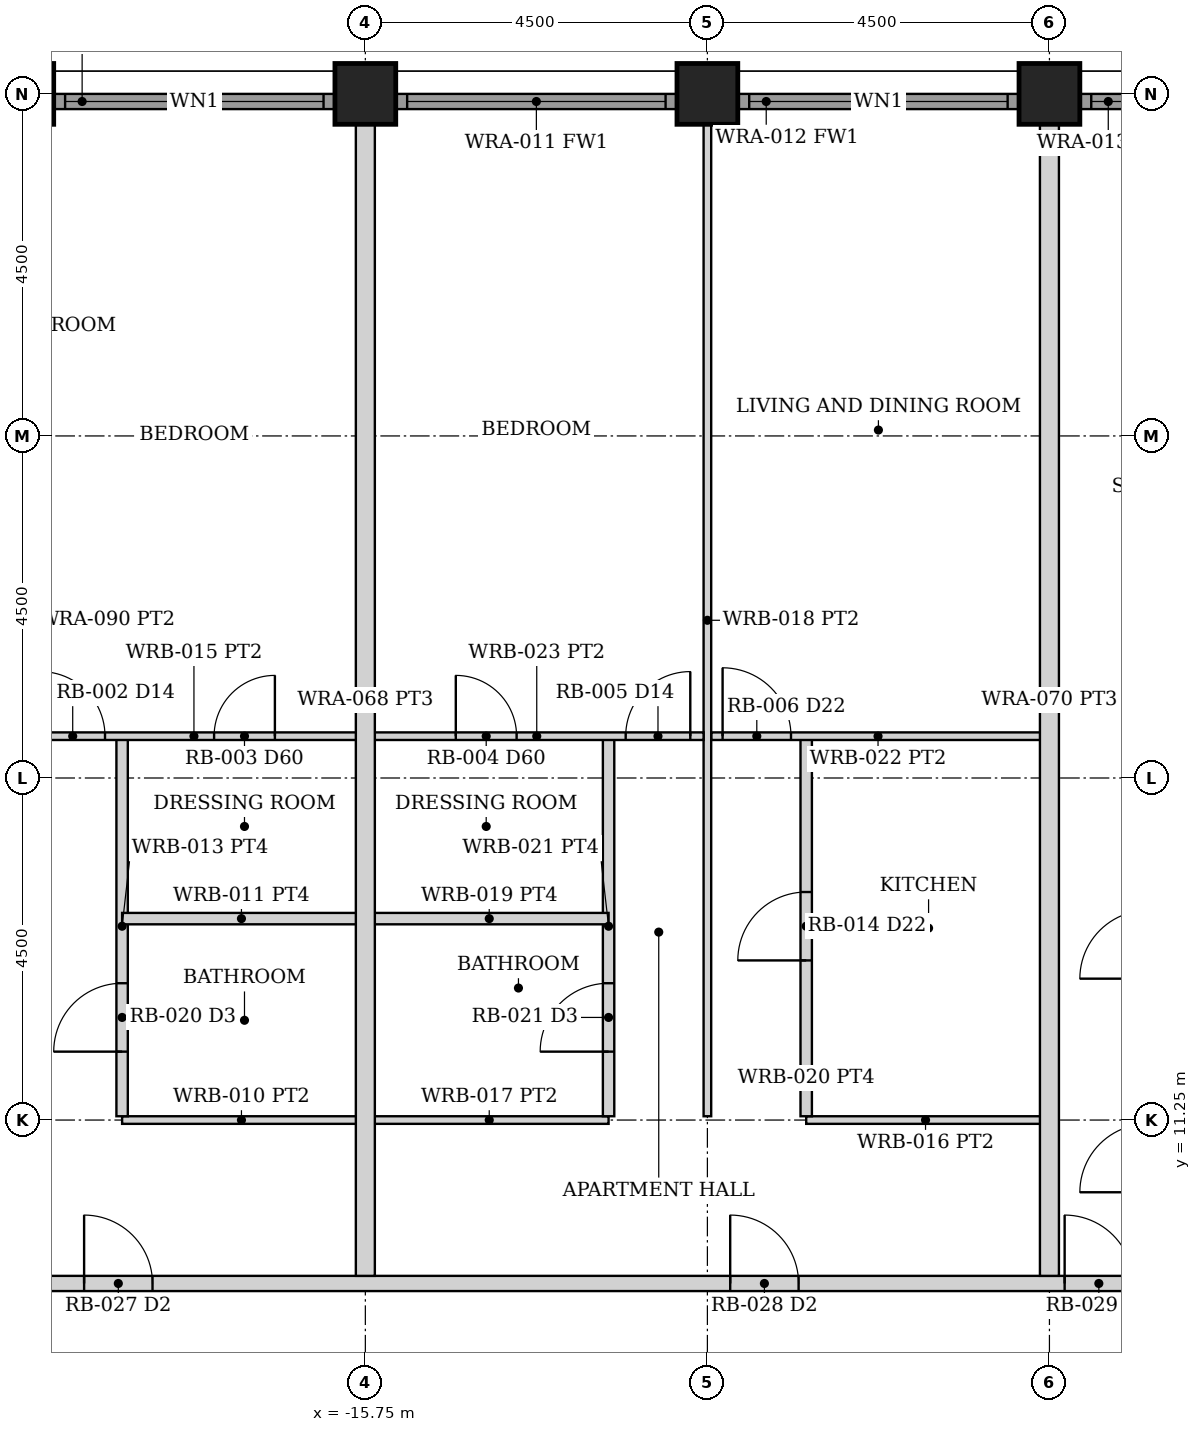
"""IFC4 building model, lengths in metres.
Left out: names, types, materials, properties, quantities, classifications, styles, units other than length and angle.
Written with IfcOpenShell. Run it as: python <this file> out.ifc"""

import sys

from ifc_helpers import new_model, si_unit, direction, frame, frame_2d, origin, origin_2d, place, context, subcontext, project, spatial, rectangle, hollow_rectangle, extrude, element, fill, save


model = new_model("IFC4")
c1 = context("Model", 3, precision=1e-05, world=origin(), true_north=direction((0.0, 1.0)))
c2 = subcontext(c1, "Body", "Model", "MODEL_VIEW")
j1 = project(units=[si_unit("LENGTHUNIT", "METRE"), si_unit("PLANEANGLEUNIT", "RADIAN")], contexts=[c1])
p1 = place(None, origin())
s1 = spatial("IfcSite", under=j1, at=p1, CompositionType="ELEMENT")
p2 = place(p1, origin())
s2 = spatial("IfcBuilding", under=s1, at=p2, CompositionType="ELEMENT")
p3 = place(p2, frame((0.0, 0.0, 37.0)))
s3 = spatial("IfcBuildingStorey", under=s2, at=p3, CompositionType="ELEMENT", Elevation=37.0)
for number, where, z_axis, x_axis in (
    (1, (-20.25, 24.75, 0.0), (0.0, 0.0, 1.0), (0.0, 1.0, 0.0)),
    (2, (-15.75, 24.75, 0.0), (0.0, 0.0, 1.0), (0.0, 1.0, 0.0)),
    (3, (-11.25, 24.75, 0.0), (0.0, 0.0, 1.0), (0.0, 1.0, 0.0)),
    (4, (-6.75, 24.75, 0.0), (0.0, 0.0, 1.0), (0.0, 1.0, 0.0)),
):
    element("IfcColumn", number, at=place(p3, frame(where, z_axis=z_axis, x_axis=x_axis)), inside=s3, PredefinedType="COLUMN", context=c2, shape_type="SweptSolid", body=[
        extrude(hollow_rectangle(XDim=0.8, YDim=0.8, WallThickness=0.07, at=origin_2d()), origin(), (0.0, 0.0, 1.0), 3.5),
    ])
p4 = place(p3, frame((-19.845, 24.65, 0.0), z_axis=(0.0, 0.0, 1.0), x_axis=(1.0, 0.0, 0.0)))
e5 = element("IfcWall", 5, at=p4, inside=s3, PredefinedType="SOLIDWALL", context=c2, shape_type="SweptSolid", body=[
    extrude(rectangle(XDim=3.69, YDim=0.2, at=frame_2d((1.845, 0.0))), origin(), (0.0, 0.0, 1.0), 2.379),
])
p5 = place(p4, frame((0.145, 0.0, 0.3)))
e6 = element("IfcOpeningElement", 6, at=p5, cuts=e5, PredefinedType="OPENING", context=c2, shape_type="SweptSolid", body=[
    extrude(rectangle(XDim=3.4, YDim=1.929, at=frame_2d((1.7, 0.964))), frame((0.0, 0.11, 0.0), z_axis=(0.0, -1.0, 0.0), x_axis=(1.0, 0.0, 0.0)), (0.0, 0.0, 1.0), 0.22),
])
p6 = place(p3, frame((-15.345, 24.65, 0.0), z_axis=(0.0, 0.0, 1.0), x_axis=(1.0, 0.0, 0.0)))
e7 = element("IfcWall", 7, at=p6, inside=s3, PredefinedType="SOLIDWALL", context=c2, shape_type="SweptSolid", body=[
    extrude(rectangle(XDim=3.69, YDim=0.2, at=frame_2d((1.845, 0.0))), origin(), (0.0, 0.0, 1.0), 2.379),
])
p7 = place(p6, frame((0.145, 0.0, 0.3)))
e8 = element("IfcOpeningElement", 8, at=p7, cuts=e7, PredefinedType="OPENING", context=c2, shape_type="SweptSolid", body=[
    extrude(rectangle(XDim=3.4, YDim=1.929, at=frame_2d((1.7, 0.964))), frame((0.0, 0.11, 0.0), z_axis=(0.0, -1.0, 0.0), x_axis=(1.0, 0.0, 0.0)), (0.0, 0.0, 1.0), 0.22),
])
p8 = place(p3, frame((-10.845, 24.65, 0.0), z_axis=(0.0, 0.0, 1.0), x_axis=(1.0, 0.0, 0.0)))
e9 = element("IfcWall", 9, at=p8, inside=s3, PredefinedType="SOLIDWALL", context=c2, shape_type="SweptSolid", body=[
    extrude(rectangle(XDim=3.69, YDim=0.2, at=frame_2d((1.845, 0.0))), origin(), (0.0, 0.0, 1.0), 2.379),
])
p9 = place(p8, frame((0.145, 0.0, 0.3)))
e10 = element("IfcOpeningElement", 10, at=p9, cuts=e9, PredefinedType="OPENING", context=c2, shape_type="SweptSolid", body=[
    extrude(rectangle(XDim=3.4, YDim=1.929, at=frame_2d((1.7, 0.964))), frame((0.0, 0.11, 0.0), z_axis=(0.0, -1.0, 0.0), x_axis=(1.0, 0.0, 0.0)), (0.0, 0.0, 1.0), 0.22),
])
p10 = place(p3, frame((-6.345, 24.65, 0.0), z_axis=(0.0, 0.0, 1.0), x_axis=(1.0, 0.0, 0.0)))
e11 = element("IfcWall", 11, at=p10, inside=s3, PredefinedType="SOLIDWALL", context=c2, shape_type="SweptSolid", body=[
    extrude(rectangle(XDim=3.69, YDim=0.2, at=frame_2d((1.845, 0.0))), origin(), (0.0, 0.0, 1.0), 2.379),
])
p11 = place(p10, frame((0.145, 0.0, 0.3)))
e12 = element("IfcOpeningElement", 12, at=p11, cuts=e11, PredefinedType="OPENING", context=c2, shape_type="SweptSolid", body=[
    extrude(rectangle(XDim=3.4, YDim=1.929, at=frame_2d((1.7, 0.964))), frame((0.0, 0.11, 0.0), z_axis=(0.0, -1.0, 0.0), x_axis=(1.0, 0.0, 0.0)), (0.0, 0.0, 1.0), 0.22),
])
p12 = place(p3, frame((-24.55, 9.1, 0.0), z_axis=(0.0, 0.0, 1.0), x_axis=(1.0, 0.0, 0.0)))
e13 = element("IfcWall", 13, at=p12, inside=s3, PredefinedType="PARTITIONING", context=c2, shape_type="SweptSolid", body=[
    extrude(rectangle(XDim=49.1, YDim=0.2, at=frame_2d((24.55, 0.0))), origin(), (0.0, 0.0, 1.0), 2.373),
])
p13 = place(p12, frame((5.1, 0.0, 0.0)))
e14 = element("IfcOpeningElement", 14, at=p13, cuts=e13, PredefinedType="OPENING", context=c2, shape_type="SweptSolid", body=[
    extrude(rectangle(XDim=0.9, YDim=2.1, at=frame_2d((0.45, 1.05))), frame((0.0, 0.11, 0.0), z_axis=(0.0, -1.0, 0.0), x_axis=(1.0, 0.0, 0.0)), (0.0, 0.0, 1.0), 0.22),
])
p14 = place(p12, frame((13.6, 0.0, 0.0)))
e15 = element("IfcOpeningElement", 15, at=p14, cuts=e13, PredefinedType="OPENING", context=c2, shape_type="SweptSolid", body=[
    extrude(rectangle(XDim=0.9, YDim=2.1, at=frame_2d((0.45, 1.05))), frame((0.0, 0.11, 0.0), z_axis=(0.0, -1.0, 0.0), x_axis=(1.0, 0.0, 0.0)), (0.0, 0.0, 1.0), 0.22),
])
p15 = place(p12, frame((18.0, 0.0, 0.0)))
e16 = element("IfcOpeningElement", 16, at=p15, cuts=e13, PredefinedType="OPENING", context=c2, shape_type="SweptSolid", body=[
    extrude(rectangle(XDim=0.9, YDim=2.1, at=frame_2d((0.45, 1.05))), frame((0.0, 0.11, 0.0), z_axis=(0.0, -1.0, 0.0), x_axis=(1.0, 0.0, 0.0)), (0.0, 0.0, 1.0), 0.22),
])
p16 = place(p12, frame((22.5, 0.0, 0.0)))
e17 = element("IfcOpeningElement", 17, at=p16, cuts=e13, PredefinedType="OPENING", context=c2, shape_type="SweptSolid", body=[
    extrude(rectangle(XDim=0.9, YDim=2.1, at=frame_2d((0.45, 1.05))), frame((0.0, 0.11, 0.0), z_axis=(0.0, -1.0, 0.0), x_axis=(1.0, 0.0, 0.0)), (0.0, 0.0, 1.0), 0.22),
])
p17 = place(p12, frame((27.0, 0.0, 0.0)))
e18 = element("IfcOpeningElement", 18, at=p17, cuts=e13, PredefinedType="OPENING", context=c2, shape_type="SweptSolid", body=[
    extrude(rectangle(XDim=0.9, YDim=2.1, at=frame_2d((0.45, 1.05))), frame((0.0, 0.11, 0.0), z_axis=(0.0, -1.0, 0.0), x_axis=(1.0, 0.0, 0.0)), (0.0, 0.0, 1.0), 0.22),
])
p18 = place(p12, frame((31.6, 0.0, 0.0)))
e19 = element("IfcOpeningElement", 19, at=p18, cuts=e13, PredefinedType="OPENING", context=c2, shape_type="SweptSolid", body=[
    extrude(rectangle(XDim=0.9, YDim=2.1, at=frame_2d((0.45, 1.05))), frame((0.0, 0.11, 0.0), z_axis=(0.0, -1.0, 0.0), x_axis=(1.0, 0.0, 0.0)), (0.0, 0.0, 1.0), 0.22),
])
p19 = place(p12, frame((43.1, 0.0, 0.0)))
e20 = element("IfcOpeningElement", 20, at=p19, cuts=e13, PredefinedType="OPENING", context=c2, shape_type="SweptSolid", body=[
    extrude(rectangle(XDim=0.9, YDim=2.1, at=frame_2d((0.45, 1.05))), frame((0.0, 0.11, 0.0), z_axis=(0.0, -1.0, 0.0), x_axis=(1.0, 0.0, 0.0)), (0.0, 0.0, 1.0), 0.22),
])
p20 = place(p3, frame((-18.95, 11.25, 0.0), z_axis=(0.0, 0.0, 1.0), x_axis=(1.0, 0.0, 0.0)))
e21 = element("IfcWall", 21, at=p20, inside=s3, PredefinedType="PARTITIONING", context=c2, shape_type="SweptSolid", body=[
    extrude(rectangle(XDim=3.14, YDim=0.1, at=frame_2d((1.57, 0.0))), origin(), (0.0, 0.0, 1.0), 2.373),
])
p21 = place(p3, frame((-18.95, 11.3, 0.0), z_axis=(0.0, 0.0, 1.0), x_axis=(0.0, 1.0, 0.0)))
e22 = element("IfcWall", 22, at=p21, inside=s3, PredefinedType="PARTITIONING", context=c2, shape_type="SweptSolid", body=[
    extrude(rectangle(XDim=5.0, YDim=0.15, at=frame_2d((2.5, 0.0))), origin(), (0.0, 0.0, 1.0), 2.373),
])
p22 = place(p21, frame((0.85, 0.0, 0.0)))
e23 = element("IfcOpeningElement", 23, at=p22, cuts=e22, PredefinedType="OPENING", context=c2, shape_type="SweptSolid", body=[
    extrude(rectangle(XDim=0.9, YDim=2.1, at=frame_2d((0.45, 1.05))), frame((0.0, 0.085, 0.0), z_axis=(0.0, -1.0, 0.0), x_axis=(1.0, 0.0, 0.0)), (0.0, 0.0, 1.0), 0.17),
])
p23 = place(p3, frame((-20.2, 16.3, 0.0), z_axis=(0.0, 0.0, 1.0), x_axis=(1.0, 0.0, 0.0)))
e24 = element("IfcWall", 24, at=p23, inside=s3, PredefinedType="PARTITIONING", context=c2, shape_type="SweptSolid", body=[
    extrude(rectangle(XDim=4.39, YDim=0.1, at=frame_2d((2.195, 0.0))), origin(), (0.0, 0.0, 1.0), 2.373),
])
p24 = place(p23, frame((0.175, 0.0, 0.0)))
e25 = element("IfcOpeningElement", 25, at=p24, cuts=e24, PredefinedType="OPENING", context=c2, shape_type="SweptSolid", body=[
    extrude(rectangle(XDim=0.85, YDim=2.1, at=frame_2d((0.425, 1.05))), frame((0.0, 0.06, 0.0), z_axis=(0.0, -1.0, 0.0), x_axis=(1.0, 0.0, 0.0)), (0.0, 0.0, 1.0), 0.12),
])
p25 = place(p23, frame((2.46, 0.0, 0.0)))
e26 = element("IfcOpeningElement", 26, at=p25, cuts=e24, PredefinedType="OPENING", context=c2, shape_type="SweptSolid", body=[
    extrude(rectangle(XDim=0.8, YDim=2.1, at=frame_2d((0.4, 1.05))), frame((0.0, 0.06, 0.0), z_axis=(0.0, -1.0, 0.0), x_axis=(1.0, 0.0, 0.0)), (0.0, 0.0, 1.0), 0.12),
])
p26 = place(p3, frame((-18.95, 13.9, 0.0), z_axis=(0.0, 0.0, 1.0), x_axis=(1.0, 0.0, 0.0)))
e27 = element("IfcWall", 27, at=p26, inside=s3, PredefinedType="PARTITIONING", context=c2, shape_type="SweptSolid", body=[
    extrude(rectangle(XDim=3.14, YDim=0.15, at=frame_2d((1.57, 0.0))), origin(), (0.0, 0.0, 1.0), 2.373),
])
p27 = place(p3, frame((-9.95, 11.25, 0.0), z_axis=(0.0, 0.0, 1.0), x_axis=(1.0, 0.0, 0.0)))
e28 = element("IfcWall", 28, at=p27, inside=s3, PredefinedType="PARTITIONING", context=c2, shape_type="SweptSolid", body=[
    extrude(rectangle(XDim=3.14, YDim=0.1, at=frame_2d((1.57, 0.0))), origin(), (0.0, 0.0, 1.0), 2.373),
])
p28 = place(p3, frame((-9.95, 11.3, 0.0), z_axis=(0.0, 0.0, 1.0), x_axis=(0.0, 1.0, 0.0)))
e29 = element("IfcWall", 29, at=p28, inside=s3, PredefinedType="PARTITIONING", context=c2, shape_type="SweptSolid", body=[
    extrude(rectangle(XDim=5.0, YDim=0.15, at=frame_2d((2.5, 0.0))), origin(), (0.0, 0.0, 1.0), 2.373),
])
p29 = place(p28, frame((2.05, 0.0, 0.0)))
e30 = element("IfcOpeningElement", 30, at=p29, cuts=e29, PredefinedType="OPENING", context=c2, shape_type="SweptSolid", body=[
    extrude(rectangle(XDim=0.9, YDim=2.1, at=frame_2d((0.45, 1.05))), frame((0.0, 0.085, 0.0), z_axis=(0.0, -1.0, 0.0), x_axis=(1.0, 0.0, 0.0)), (0.0, 0.0, 1.0), 0.17),
])
p30 = place(p3, frame((-11.2, 16.3, 0.0), z_axis=(0.0, 0.0, 1.0), x_axis=(1.0, 0.0, 0.0)))
e31 = element("IfcWall", 31, at=p30, inside=s3, PredefinedType="PARTITIONING", context=c2, shape_type="SweptSolid", body=[
    extrude(rectangle(XDim=4.39, YDim=0.1, at=frame_2d((2.195, 0.0))), origin(), (0.0, 0.0, 1.0), 2.373),
])
p31 = place(p30, frame((0.15, 0.0, 0.0)))
e32 = element("IfcOpeningElement", 32, at=p31, cuts=e31, PredefinedType="OPENING", context=c2, shape_type="SweptSolid", body=[
    extrude(rectangle(XDim=0.9, YDim=2.1, at=frame_2d((0.45, 1.05))), frame((0.0, 0.06, 0.0), z_axis=(0.0, -1.0, 0.0), x_axis=(1.0, 0.0, 0.0)), (0.0, 0.0, 1.0), 0.12),
])
p32 = place(p3, frame((-11.25, 11.3, 0.0), z_axis=(0.0, 0.0, 1.0), x_axis=(0.0, 1.0, 0.0)))
e33 = element("IfcWall", 33, at=p32, inside=s3, PredefinedType="PARTITIONING", context=c2, shape_type="SweptSolid", body=[
    extrude(rectangle(XDim=13.05, YDim=0.1, at=frame_2d((6.525, 0.0))), origin(), (0.0, 0.0, 1.0), 2.373),
])
p33 = place(p3, frame((-15.69, 11.25, 0.0), z_axis=(0.0, 0.0, 1.0), x_axis=(1.0, 0.0, 0.0)))
e34 = element("IfcWall", 34, at=p33, inside=s3, PredefinedType="PARTITIONING", context=c2, shape_type="SweptSolid", body=[
    extrude(rectangle(XDim=3.14, YDim=0.1, at=frame_2d((1.57, 0.0))), origin(), (0.0, 0.0, 1.0), 2.373),
])
p34 = place(p3, frame((-12.55, 11.3, 0.0), z_axis=(0.0, 0.0, 1.0), x_axis=(0.0, 1.0, 0.0)))
e35 = element("IfcWall", 35, at=p34, inside=s3, PredefinedType="PARTITIONING", context=c2, shape_type="SweptSolid", body=[
    extrude(rectangle(XDim=5.0, YDim=0.15, at=frame_2d((2.5, 0.0))), origin(), (0.0, 0.0, 1.0), 2.373),
])
p35 = place(p34, frame((0.85, 0.0, 0.0)))
e36 = element("IfcOpeningElement", 36, at=p35, cuts=e35, PredefinedType="OPENING", context=c2, shape_type="SweptSolid", body=[
    extrude(rectangle(XDim=0.9, YDim=2.1, at=frame_2d((0.45, 1.05))), frame((0.0, 0.085, 0.0), z_axis=(0.0, -1.0, 0.0), x_axis=(1.0, 0.0, 0.0)), (0.0, 0.0, 1.0), 0.17),
])
p36 = place(p3, frame((-15.69, 16.3, 0.0), z_axis=(0.0, 0.0, 1.0), x_axis=(1.0, 0.0, 0.0)))
e37 = element("IfcWall", 37, at=p36, inside=s3, PredefinedType="PARTITIONING", context=c2, shape_type="SweptSolid", body=[
    extrude(rectangle(XDim=4.39, YDim=0.1, at=frame_2d((2.195, 0.0))), origin(), (0.0, 0.0, 1.0), 2.373),
])
p37 = place(p36, frame((3.365, 0.0, 0.0)))
e38 = element("IfcOpeningElement", 38, at=p37, cuts=e37, PredefinedType="OPENING", context=c2, shape_type="SweptSolid", body=[
    extrude(rectangle(XDim=0.85, YDim=2.1, at=frame_2d((0.425, 1.05))), frame((0.0, 0.06, 0.0), z_axis=(0.0, -1.0, 0.0), x_axis=(1.0, 0.0, 0.0)), (0.0, 0.0, 1.0), 0.12),
])
p38 = place(p36, frame((1.13, 0.0, 0.0)))
e39 = element("IfcOpeningElement", 39, at=p38, cuts=e37, PredefinedType="OPENING", context=c2, shape_type="SweptSolid", body=[
    extrude(rectangle(XDim=0.8, YDim=2.1, at=frame_2d((0.4, 1.05))), frame((0.0, 0.06, 0.0), z_axis=(0.0, -1.0, 0.0), x_axis=(1.0, 0.0, 0.0)), (0.0, 0.0, 1.0), 0.12),
])
p39 = place(p3, frame((-15.69, 13.9, 0.0), z_axis=(0.0, 0.0, 1.0), x_axis=(1.0, 0.0, 0.0)))
e40 = element("IfcWall", 40, at=p39, inside=s3, PredefinedType="PARTITIONING", context=c2, shape_type="SweptSolid", body=[
    extrude(rectangle(XDim=3.14, YDim=0.15, at=frame_2d((1.57, 0.0))), origin(), (0.0, 0.0, 1.0), 2.373),
])
for number, where, z_axis, x_axis in (
    (41, (-15.75, 9.2, 0.0), (0.0, 0.0, 1.0), (0.0, 1.0, 0.0)),
    (42, (-6.75, 9.2, 0.0), (0.0, 0.0, 1.0), (0.0, 1.0, 0.0)),
):
    element("IfcWall", number, at=place(p3, frame(where, z_axis=z_axis, x_axis=x_axis)), inside=s3, PredefinedType="PARTITIONING", context=c2, shape_type="SweptSolid", body=[
        extrude(rectangle(XDim=15.15, YDim=0.25, at=frame_2d((7.575, 0.0))), origin(), (0.0, 0.0, 1.0), 2.373),
    ])
p40 = place(p5, origin())
e43 = element("IfcWindow", 43, at=p40, inside=s3, PartitioningType="SINGLE_PANEL", PredefinedType="WINDOW", context=c2, shape_type="SweptSolid", body=[
    extrude(rectangle(XDim=3.4, YDim=1.929, at=frame_2d((1.7, 0.964))), frame((0.0, 0.03, 0.0), z_axis=(0.0, -1.0, 0.0), x_axis=(1.0, 0.0, 0.0)), (0.0, 0.0, 1.0), 0.06),
])
fill(e6, e43)
p41 = place(p7, origin())
e44 = element("IfcWindow", 44, at=p41, inside=s3, PartitioningType="SINGLE_PANEL", PredefinedType="WINDOW", context=c2, shape_type="SweptSolid", body=[
    extrude(rectangle(XDim=3.4, YDim=1.929, at=frame_2d((1.7, 0.964))), frame((0.0, 0.03, 0.0), z_axis=(0.0, -1.0, 0.0), x_axis=(1.0, 0.0, 0.0)), (0.0, 0.0, 1.0), 0.06),
])
fill(e8, e44)
p42 = place(p9, origin())
e45 = element("IfcWindow", 45, at=p42, inside=s3, PartitioningType="SINGLE_PANEL", PredefinedType="WINDOW", context=c2, shape_type="SweptSolid", body=[
    extrude(rectangle(XDim=3.4, YDim=1.929, at=frame_2d((1.7, 0.964))), frame((0.0, 0.03, 0.0), z_axis=(0.0, -1.0, 0.0), x_axis=(1.0, 0.0, 0.0)), (0.0, 0.0, 1.0), 0.06),
])
fill(e10, e45)
p43 = place(p11, origin())
e46 = element("IfcWindow", 46, at=p43, inside=s3, PartitioningType="SINGLE_PANEL", PredefinedType="WINDOW", context=c2, shape_type="SweptSolid", body=[
    extrude(rectangle(XDim=3.4, YDim=1.929, at=frame_2d((1.7, 0.964))), frame((0.0, 0.03, 0.0), z_axis=(0.0, -1.0, 0.0), x_axis=(1.0, 0.0, 0.0)), (0.0, 0.0, 1.0), 0.06),
])
fill(e12, e46)
p44 = place(p13, origin())
e47 = element("IfcDoor", 47, at=p44, inside=s3, OperationType="SINGLE_SWING_LEFT", PredefinedType="DOOR", context=c2, shape_type="SweptSolid", body=[
    extrude(rectangle(XDim=0.9, YDim=2.1, at=frame_2d((0.45, 1.05))), frame((0.0, 0.025, 0.0), z_axis=(0.0, -1.0, 0.0), x_axis=(1.0, 0.0, 0.0)), (0.0, 0.0, 1.0), 0.05),
])
fill(e14, e47)
p45 = place(p24, origin())
e48 = element("IfcDoor", 48, at=p45, inside=s3, OperationType="SINGLE_SWING_LEFT", PredefinedType="DOOR", context=c2, shape_type="SweptSolid", body=[
    extrude(rectangle(XDim=0.85, YDim=2.1, at=frame_2d((0.425, 1.05))), frame((0.0, 0.025, 0.0), z_axis=(0.0, -1.0, 0.0), x_axis=(1.0, 0.0, 0.0)), (0.0, 0.0, 1.0), 0.05),
])
fill(e25, e48)
p46 = place(p22, origin())
e49 = element("IfcDoor", 49, at=p46, inside=s3, OperationType="SINGLE_SWING_LEFT", PredefinedType="DOOR", context=c2, shape_type="SweptSolid", body=[
    extrude(rectangle(XDim=0.9, YDim=2.1, at=frame_2d((0.45, 1.05))), frame((0.0, 0.025, 0.0), z_axis=(0.0, -1.0, 0.0), x_axis=(1.0, 0.0, 0.0)), (0.0, 0.0, 1.0), 0.05),
])
fill(e23, e49)
p47 = place(p25, origin())
e50 = element("IfcDoor", 50, at=p47, inside=s3, OperationType="SINGLE_SWING_RIGHT", PredefinedType="DOOR", context=c2, shape_type="SweptSolid", body=[
    extrude(rectangle(XDim=0.8, YDim=2.1, at=frame_2d((0.4, 1.05))), frame((0.0, 0.025, 0.0), z_axis=(0.0, -1.0, 0.0), x_axis=(1.0, 0.0, 0.0)), (0.0, 0.0, 1.0), 0.05),
])
fill(e26, e50)
p48 = place(p14, origin())
e51 = element("IfcDoor", 51, at=p48, inside=s3, OperationType="SINGLE_SWING_LEFT", PredefinedType="DOOR", context=c2, shape_type="SweptSolid", body=[
    extrude(rectangle(XDim=0.9, YDim=2.1, at=frame_2d((0.45, 1.05))), frame((0.0, 0.025, 0.0), z_axis=(0.0, -1.0, 0.0), x_axis=(1.0, 0.0, 0.0)), (0.0, 0.0, 1.0), 0.05),
])
fill(e15, e51)
p49 = place(p29, origin())
e52 = element("IfcDoor", 52, at=p49, inside=s3, OperationType="SINGLE_SWING_LEFT", PredefinedType="DOOR", context=c2, shape_type="SweptSolid", body=[
    extrude(rectangle(XDim=0.9, YDim=2.1, at=frame_2d((0.45, 1.05))), frame((0.0, 0.025, 0.0), z_axis=(0.0, -1.0, 0.0), x_axis=(1.0, 0.0, 0.0)), (0.0, 0.0, 1.0), 0.05),
])
fill(e30, e52)
p50 = place(p31, origin())
e53 = element("IfcDoor", 53, at=p50, inside=s3, OperationType="SINGLE_SWING_LEFT", PredefinedType="DOOR", context=c2, shape_type="SweptSolid", body=[
    extrude(rectangle(XDim=0.9, YDim=2.1, at=frame_2d((0.45, 1.05))), frame((0.0, 0.025, 0.0), z_axis=(0.0, -1.0, 0.0), x_axis=(1.0, 0.0, 0.0)), (0.0, 0.0, 1.0), 0.05),
])
fill(e32, e53)
p51 = place(p37, origin())
e54 = element("IfcDoor", 54, at=p51, inside=s3, OperationType="SINGLE_SWING_RIGHT", PredefinedType="DOOR", context=c2, shape_type="SweptSolid", body=[
    extrude(rectangle(XDim=0.85, YDim=2.1, at=frame_2d((0.425, 1.05))), frame((0.0, 0.025, 0.0), z_axis=(0.0, -1.0, 0.0), x_axis=(1.0, 0.0, 0.0)), (0.0, 0.0, 1.0), 0.05),
])
fill(e38, e54)
p52 = place(p35, origin())
e55 = element("IfcDoor", 55, at=p52, inside=s3, OperationType="SINGLE_SWING_LEFT", PredefinedType="DOOR", context=c2, shape_type="SweptSolid", body=[
    extrude(rectangle(XDim=0.9, YDim=2.1, at=frame_2d((0.45, 1.05))), frame((0.0, 0.025, 0.0), z_axis=(0.0, -1.0, 0.0), x_axis=(1.0, 0.0, 0.0)), (0.0, 0.0, 1.0), 0.05),
])
fill(e36, e55)
p53 = place(p38, origin())
e56 = element("IfcDoor", 56, at=p53, inside=s3, OperationType="SINGLE_SWING_LEFT", PredefinedType="DOOR", context=c2, shape_type="SweptSolid", body=[
    extrude(rectangle(XDim=0.8, YDim=2.1, at=frame_2d((0.4, 1.05))), frame((0.0, 0.025, 0.0), z_axis=(0.0, -1.0, 0.0), x_axis=(1.0, 0.0, 0.0)), (0.0, 0.0, 1.0), 0.05),
])
fill(e39, e56)
p54 = place(p15, origin())
e57 = element("IfcDoor", 57, at=p54, inside=s3, OperationType="SINGLE_SWING_LEFT", PredefinedType="DOOR", context=c2, shape_type="SweptSolid", body=[
    extrude(rectangle(XDim=0.9, YDim=2.1, at=frame_2d((0.45, 1.05))), frame((0.0, 0.025, 0.0), z_axis=(0.0, -1.0, 0.0), x_axis=(1.0, 0.0, 0.0)), (0.0, 0.0, 1.0), 0.05),
])
fill(e16, e57)
save(model, sys.argv[1])
